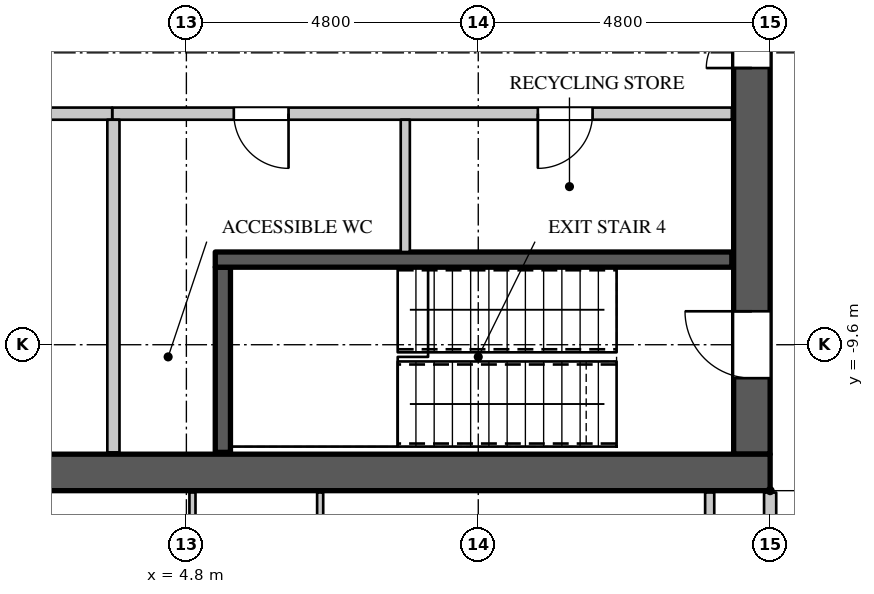
"""IFC4 building model, lengths in metres.
Left out: names, types, materials, properties, quantities, classifications, styles, units other than length and angle.
Written with IfcOpenShell. Run it as: python <this file> out.ifc"""

import sys

from ifc_helpers import new_model, si_unit, direction, frame, frame_2d, origin, place, context, subcontext, project, spatial, rectangle, extrude, element, fill, save


model = new_model("IFC4")
c1 = context("Model", 3, precision=1e-05, world=origin(), true_north=direction((0.0, 1.0)))
c2 = subcontext(c1, "Body", "Model", "MODEL_VIEW")
j1 = project(units=[si_unit("LENGTHUNIT", "METRE"), si_unit("PLANEANGLEUNIT", "RADIAN")], contexts=[c1])
p1 = place(None, origin())
s1 = spatial("IfcSite", under=j1, at=p1, CompositionType="ELEMENT")
p2 = place(p1, origin())
s2 = spatial("IfcBuilding", under=s1, at=p2, CompositionType="ELEMENT")
p3 = place(p2, frame((0.0, 0.0, 260.1)))
s3 = spatial("IfcBuildingStorey", under=s2, at=p3, CompositionType="ELEMENT", Elevation=260.1)
p4 = place(p3, frame((-14.4, -11.7, 0.0), z_axis=(0.0, 0.0, 1.0), x_axis=(1.0, 0.0, 0.0)))
e1 = element("IfcWall", 1, at=p4, inside=s3, PredefinedType="SHEAR", context=c2, shape_type="SweptSolid", body=[
    extrude(rectangle(XDim=28.8, YDim=0.6, at=frame_2d((14.4, 0.0))), origin(), (0.0, 0.0, 1.0), 4.2),
])
p5 = place(p3, frame((14.1, -11.4, 0.0), z_axis=(0.0, 0.0, 1.0), x_axis=(0.0, 1.0, 0.0)))
e2 = element("IfcWall", 2, at=p5, inside=s3, PredefinedType="SHEAR", context=c2, shape_type="SweptSolid", body=[
    extrude(rectangle(XDim=22.8, YDim=0.6, at=frame_2d((11.4, 0.0))), origin(), (0.0, 0.0, 1.0), 4.2),
])
p6 = place(p5, frame((20.45, 0.0, 0.0)))
e3 = element("IfcOpeningElement", 3, at=p6, cuts=e2, PredefinedType="OPENING", context=c2, shape_type="SweptSolid", body=[
    extrude(rectangle(XDim=1.1, YDim=2.2, at=frame_2d((0.55, 1.1))), frame((0.0, 0.31, 0.0), z_axis=(0.0, -1.0, 0.0), x_axis=(1.0, 0.0, 0.0)), (0.0, 0.0, 1.0), 0.62),
])
p7 = place(p5, frame((1.25, 0.0, 0.0)))
e4 = element("IfcOpeningElement", 4, at=p7, cuts=e2, PredefinedType="OPENING", context=c2, shape_type="SweptSolid", body=[
    extrude(rectangle(XDim=1.1, YDim=2.2, at=frame_2d((0.55, 1.1))), frame((0.0, 0.31, 0.0), z_axis=(0.0, -1.0, 0.0), x_axis=(1.0, 0.0, 0.0)), (0.0, 0.0, 1.0), 0.62),
])
p8 = place(p5, frame((14.95, 0.0, 0.0)))
e5 = element("IfcOpeningElement", 5, at=p8, cuts=e2, PredefinedType="OPENING", context=c2, shape_type="SweptSolid", body=[
    extrude(rectangle(XDim=1.5, YDim=2.4, at=frame_2d((0.75, 1.2))), frame((0.0, 0.31, 0.0), z_axis=(0.0, -1.0, 0.0), x_axis=(1.0, 0.0, 0.0)), (0.0, 0.0, 1.0), 0.62),
])
p9 = place(p5, frame((6.35, 0.0, 0.0)))
e6 = element("IfcOpeningElement", 6, at=p9, cuts=e2, PredefinedType="OPENING", context=c2, shape_type="SweptSolid", body=[
    extrude(rectangle(XDim=1.5, YDim=2.4, at=frame_2d((0.75, 1.2))), frame((0.0, 0.31, 0.0), z_axis=(0.0, -1.0, 0.0), x_axis=(1.0, 0.0, 0.0)), (0.0, 0.0, 1.0), 0.62),
])
p10 = place(p3, frame((3.58, -5.8, 0.0), z_axis=(0.0, 0.0, 1.0), x_axis=(1.0, 0.0, 0.0)))
e7 = element("IfcWall", 7, at=p10, inside=s3, PredefinedType="PARTITIONING", context=c2, shape_type="SweptSolid", body=[
    extrude(rectangle(XDim=10.19, YDim=0.2, at=frame_2d((5.095, 0.0))), origin(), (0.0, 0.0, 1.0), 3.95),
])
p11 = place(p10, frame((2.0, 0.0, 0.0)))
e8 = element("IfcOpeningElement", 8, at=p11, cuts=e7, PredefinedType="OPENING", context=c2, shape_type="SweptSolid", body=[
    extrude(rectangle(XDim=0.9, YDim=2.2, at=frame_2d((0.45, 1.1))), frame((0.0, 0.11, 0.0), z_axis=(0.0, -1.0, 0.0), x_axis=(1.0, 0.0, 0.0)), (0.0, 0.0, 1.0), 0.22),
])
p12 = place(p10, frame((7.0, 0.0, 0.0)))
e9 = element("IfcOpeningElement", 9, at=p12, cuts=e7, PredefinedType="OPENING", context=c2, shape_type="SweptSolid", body=[
    extrude(rectangle(XDim=0.9, YDim=2.2, at=frame_2d((0.45, 1.1))), frame((0.0, 0.11, 0.0), z_axis=(0.0, -1.0, 0.0), x_axis=(1.0, 0.0, 0.0)), (0.0, 0.0, 1.0), 0.22),
])
p13 = place(p3, frame((14.4, -14.3, 0.0), z_axis=(0.0, 0.0, 1.0), x_axis=(0.0, 1.0, 0.0)))
e10 = element("IfcWall", 10, at=p13, inside=s3, PredefinedType="PARTITIONING", context=c2, shape_type="SweptSolid", body=[
    extrude(rectangle(XDim=2.27, YDim=0.2, at=frame_2d((1.135, 0.0))), origin(), (0.0, 0.0, 1.0), 3.95),
])
p14 = place(p3, frame((8.4, -8.075, 0.0), z_axis=(0.0, 0.0, 1.0), x_axis=(0.0, 1.0, 0.0)))
e11 = element("IfcWall", 11, at=p14, inside=s3, PredefinedType="PARTITIONING", context=c2, shape_type="SweptSolid", body=[
    extrude(rectangle(XDim=2.175, YDim=0.15, at=frame_2d((1.087, 0.0))), origin(), (0.0, 0.0, 1.0), 3.95),
])
p15 = place(p3, frame((13.406, -25.731, 0.0), z_axis=(0.0, 0.0, 1.0), x_axis=(0.0, 1.0, 0.0)))
e12 = element("IfcWall", 12, at=p15, inside=s3, PredefinedType="PARTITIONING", context=c2, shape_type="SweptSolid", body=[
    extrude(rectangle(XDim=13.701, YDim=0.15, at=frame_2d((6.851, 0.0))), origin(), (0.0, 0.0, 1.0), 3.3),
])
p16 = place(p15, frame((9.7, 0.0, 0.0)))
e13 = element("IfcOpeningElement", 13, at=p16, cuts=e12, PredefinedType="OPENING", context=c2, shape_type="SweptSolid", body=[
    extrude(rectangle(XDim=1.5, YDim=2.2, at=frame_2d((0.75, 1.1))), frame((0.0, 0.085, 0.0), z_axis=(0.0, -1.0, 0.0), x_axis=(1.0, 0.0, 0.0)), (0.0, 0.0, 1.0), 0.17),
])
p17 = place(p3, frame((-0.58, -5.8, 0.0), z_axis=(0.0, 0.0, 1.0), x_axis=(1.0, 0.0, 0.0)))
e14 = element("IfcWall", 14, at=p17, inside=s3, PredefinedType="PARTITIONING", context=c2, shape_type="SweptSolid", body=[
    extrude(rectangle(XDim=4.16, YDim=0.2, at=frame_2d((2.08, 0.0))), origin(), (0.0, 0.0, 1.0), 3.95),
])
p18 = place(p17, frame((1.6, 0.0, 0.0)))
e15 = element("IfcOpeningElement", 15, at=p18, cuts=e14, PredefinedType="OPENING", context=c2, shape_type="SweptSolid", body=[
    extrude(rectangle(XDim=0.9, YDim=2.2, at=frame_2d((0.45, 1.1))), frame((0.0, 0.11, 0.0), z_axis=(0.0, -1.0, 0.0), x_axis=(1.0, 0.0, 0.0)), (0.0, 0.0, 1.0), 0.22),
])
p19 = place(p3, frame((3.6, -11.37, 0.0), z_axis=(0.0, 0.0, 1.0), x_axis=(0.0, 1.0, 0.0)))
e16 = element("IfcWall", 16, at=p19, inside=s3, PredefinedType="PARTITIONING", context=c2, shape_type="SweptSolid", body=[
    extrude(rectangle(XDim=5.47, YDim=0.2, at=frame_2d((2.735, 0.0))), origin(), (0.0, 0.0, 1.0), 3.95),
])
p20 = place(p3, frame((5.4, -11.37, 0.0), z_axis=(0.0, 0.0, 1.0), x_axis=(0.0, 1.0, 0.0)))
e17 = element("IfcWall", 17, at=p20, inside=s3, PredefinedType="SHEAR", context=c2, shape_type="SweptSolid", body=[
    extrude(rectangle(XDim=3.045, YDim=0.25, at=frame_2d((1.522, 0.0))), origin(), (0.0, 0.0, 1.0), 3.95),
])
p21 = place(p3, frame((5.275, -8.2, 0.0), z_axis=(0.0, 0.0, 1.0), x_axis=(1.0, 0.0, 0.0)))
e18 = element("IfcWall", 18, at=p21, inside=s3, PredefinedType="SHEAR", context=c2, shape_type="SweptSolid", body=[
    extrude(rectangle(XDim=8.495, YDim=0.25, at=frame_2d((4.248, 0.0))), origin(), (0.0, 0.0, 1.0), 3.95),
])
p22 = place(p3, frame((4.9, -16.975, 0.0), z_axis=(0.0, 0.0, 1.0), x_axis=(0.0, 1.0, 0.0)))
e19 = element("IfcWall", 19, at=p22, inside=s3, PredefinedType="PARTITIONING", context=c2, shape_type="SweptSolid", body=[
    extrude(rectangle(XDim=4.945, YDim=0.1, at=frame_2d((2.473, 0.0))), origin(), (0.0, 0.0, 1.0), 3.95),
])
p23 = place(p3, frame((7.0, -16.975, 0.0), z_axis=(0.0, 0.0, 1.0), x_axis=(0.0, 1.0, 0.0)))
e20 = element("IfcWall", 20, at=p23, inside=s3, PredefinedType="PARTITIONING", context=c2, shape_type="SweptSolid", body=[
    extrude(rectangle(XDim=4.945, YDim=0.1, at=frame_2d((2.473, 0.0))), origin(), (0.0, 0.0, 1.0), 3.95),
])
p24 = place(p23, frame((2.0, 0.0, 0.0)))
e21 = element("IfcOpeningElement", 21, at=p24, cuts=e20, PredefinedType="OPENING", context=c2, shape_type="SweptSolid", body=[
    extrude(rectangle(XDim=0.9, YDim=2.2, at=frame_2d((0.45, 1.1))), frame((0.0, 0.06, 0.0), z_axis=(0.0, -1.0, 0.0), x_axis=(1.0, 0.0, 0.0)), (0.0, 0.0, 1.0), 0.12),
])
p25 = place(p11, origin())
e22 = element("IfcDoor", 22, at=p25, inside=s3, OperationType="SINGLE_SWING_LEFT", PredefinedType="DOOR", context=c2, shape_type="SweptSolid", body=[
    extrude(rectangle(XDim=0.9, YDim=2.2, at=frame_2d((0.45, 1.1))), frame((0.0, 0.025, 0.0), z_axis=(0.0, -1.0, 0.0), x_axis=(1.0, 0.0, 0.0)), (0.0, 0.0, 1.0), 0.05),
])
fill(e8, e22)
p26 = place(p12, origin())
e23 = element("IfcDoor", 23, at=p26, inside=s3, OperationType="SINGLE_SWING_RIGHT", PredefinedType="DOOR", context=c2, shape_type="SweptSolid", body=[
    extrude(rectangle(XDim=0.9, YDim=2.2, at=frame_2d((0.45, 1.1))), frame((0.0, 0.025, 0.0), z_axis=(0.0, -1.0, 0.0), x_axis=(1.0, 0.0, 0.0)), (0.0, 0.0, 1.0), 0.05),
])
fill(e9, e23)
p27 = place(p7, origin())
e24 = element("IfcDoor", 24, at=p27, inside=s3, OperationType="SINGLE_SWING_RIGHT", PredefinedType="DOOR", context=c2, shape_type="SweptSolid", body=[
    extrude(rectangle(XDim=1.1, YDim=2.2, at=frame_2d((0.55, 1.1))), frame((0.0, 0.295, 0.0), z_axis=(0.0, -1.0, 0.0), x_axis=(1.0, 0.0, 0.0)), (0.0, 0.0, 1.0), 0.05),
])
fill(e4, e24)
p28 = place(p9, origin())
e25 = element("IfcDoor", 25, at=p28, inside=s3, OperationType="DOUBLE_DOOR_SINGLE_SWING", PredefinedType="DOOR", context=c2, shape_type="SweptSolid", body=[
    extrude(rectangle(XDim=1.5, YDim=2.4, at=frame_2d((0.75, 1.2))), frame((0.0, 0.295, 0.0), z_axis=(0.0, -1.0, 0.0), x_axis=(1.0, 0.0, 0.0)), (0.0, 0.0, 1.0), 0.05),
])
fill(e6, e25)
save(model, sys.argv[1])
